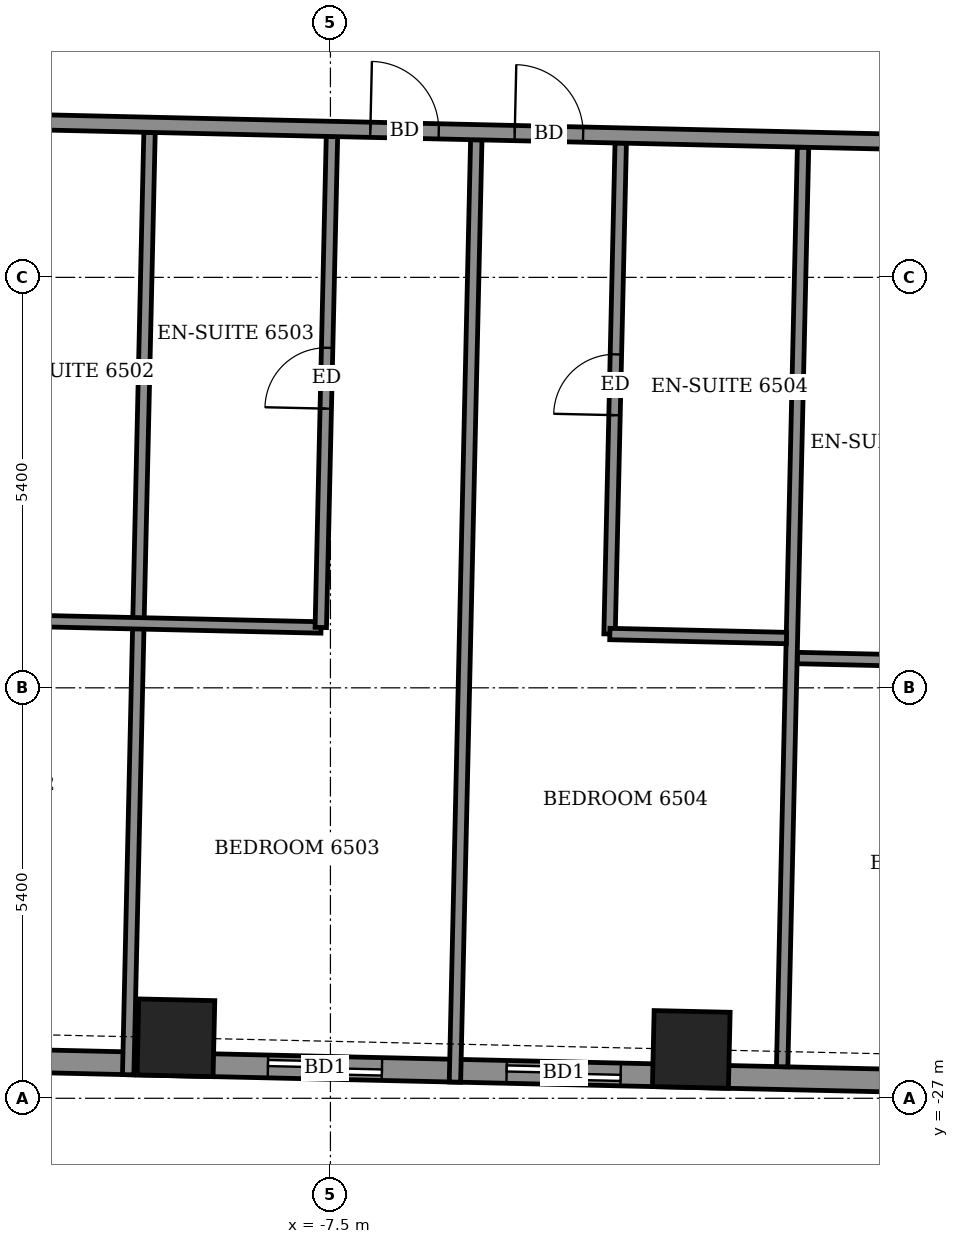
"""IFC4 building model, lengths in metres.
Left out: names, types, materials, properties, quantities, classifications, styles, units other than length and angle.
Written with IfcOpenShell. Run it as: python <this file> out.ifc"""

import sys

from ifc_helpers import new_model, si_unit, direction, frame, frame_2d, origin, origin_2d, place, context, subcontext, project, spatial, rectangle, extrude, element, fill, save


model = new_model("IFC4")
c1 = context("Model", 3, precision=1e-05, world=origin(), true_north=direction((0.0, 1.0)))
c2 = subcontext(c1, "Body", "Model", "MODEL_VIEW")
j1 = project(units=[si_unit("LENGTHUNIT", "METRE"), si_unit("PLANEANGLEUNIT", "RADIAN")], contexts=[c1])
p1 = place(None, origin())
s1 = spatial("IfcSite", under=j1, at=p1, CompositionType="ELEMENT")
p2 = place(p1, origin())
s2 = spatial("IfcBuilding", under=s1, at=p2, CompositionType="ELEMENT")
p3 = place(p2, frame((0.0, 0.0, 257.3)))
s3 = spatial("IfcBuildingStorey", under=s2, at=p3, CompositionType="ELEMENT", Elevation=257.3)
for number, where, z_axis, x_axis in (
    (1, (-9.533, -26.204, -0.55), (0.0, 0.0, 1.0), (1.0, -0.023, 0.0)),
    (2, (-2.753, -26.357, -0.55), (0.0, 0.0, 1.0), (1.0, -0.023, 0.0)),
):
    element("IfcColumn", number, at=place(p3, frame(where, z_axis=z_axis, x_axis=x_axis)), inside=s3, PredefinedType="COLUMN", context=c2, shape_type="SweptSolid", body=[
        extrude(rectangle(XDim=1.0, YDim=1.0, at=origin_2d()), origin(), (0.0, 0.0, 1.0), 3.6),
    ])
p4 = place(p3, frame((-22.95, -26.249, 0.0), z_axis=(0.0, 0.0, 1.0), x_axis=(0.999742196137, -0.022705533743, 0.0)))
e3 = element("IfcWall", 3, at=p4, inside=s3, PredefinedType="SOLIDWALL", context=c2, shape_type="SweptSolid", body=[
    extrude(rectangle(XDim=47.171, YDim=0.3, at=frame_2d((23.585, 0.0))), origin(), (0.0, 0.0, 1.0), 2.55),
])
p5 = place(p4, frame((1.676, 0.0, 0.0)))
e4 = element("IfcOpeningElement", 4, at=p5, cuts=e3, PredefinedType="OPENING", context=c2, shape_type="SweptSolid", body=[
    extrude(rectangle(XDim=1.5, YDim=2.4, at=frame_2d((0.75, 1.2))), frame((0.0, 0.16, 0.0), z_axis=(0.0, -1.0, 0.0), x_axis=(1.0, 0.0, 0.0)), (0.0, 0.0, 1.0), 0.32),
])
p6 = place(p4, frame((4.741, 0.0, 0.0)))
e5 = element("IfcOpeningElement", 5, at=p6, cuts=e3, PredefinedType="OPENING", context=c2, shape_type="SweptSolid", body=[
    extrude(rectangle(XDim=1.2, YDim=2.4, at=frame_2d((0.6, 1.2))), frame((0.0, 0.16, 0.0), z_axis=(0.0, -1.0, 0.0), x_axis=(1.0, 0.0, 0.0)), (0.0, 0.0, 1.0), 0.32),
])
p7 = place(p4, frame((9.9, 0.0, 0.0)))
e6 = element("IfcOpeningElement", 6, at=p7, cuts=e3, PredefinedType="OPENING", context=c2, shape_type="SweptSolid", body=[
    extrude(rectangle(XDim=1.5, YDim=2.4, at=frame_2d((0.75, 1.2))), frame((0.0, 0.16, 0.0), z_axis=(0.0, -1.0, 0.0), x_axis=(1.0, 0.0, 0.0)), (0.0, 0.0, 1.0), 0.32),
])
p8 = place(p4, frame((14.632, 0.0, 0.0)))
e7 = element("IfcOpeningElement", 7, at=p8, cuts=e3, PredefinedType="OPENING", context=c2, shape_type="SweptSolid", body=[
    extrude(rectangle(XDim=1.5, YDim=2.4, at=frame_2d((0.75, 1.2))), frame((0.0, 0.16, 0.0), z_axis=(0.0, -1.0, 0.0), x_axis=(1.0, 0.0, 0.0)), (0.0, 0.0, 1.0), 0.32),
])
p9 = place(p4, frame((17.773, 0.0, 0.0)))
e8 = element("IfcOpeningElement", 8, at=p9, cuts=e3, PredefinedType="OPENING", context=c2, shape_type="SweptSolid", body=[
    extrude(rectangle(XDim=1.5, YDim=2.4, at=frame_2d((0.75, 1.2))), frame((0.0, 0.16, 0.0), z_axis=(0.0, -1.0, 0.0), x_axis=(1.0, 0.0, 0.0)), (0.0, 0.0, 1.0), 0.32),
])
p10 = place(p4, frame((22.825, 0.0, 0.0)))
e9 = element("IfcOpeningElement", 9, at=p10, cuts=e3, PredefinedType="OPENING", context=c2, shape_type="SweptSolid", body=[
    extrude(rectangle(XDim=1.5, YDim=2.4, at=frame_2d((0.75, 1.2))), frame((0.0, 0.16, 0.0), z_axis=(0.0, -1.0, 0.0), x_axis=(1.0, 0.0, 0.0)), (0.0, 0.0, 1.0), 0.32),
])
p11 = place(p4, frame((27.863, 0.0, 0.0)))
e10 = element("IfcOpeningElement", 10, at=p11, cuts=e3, PredefinedType="OPENING", context=c2, shape_type="SweptSolid", body=[
    extrude(rectangle(XDim=1.5, YDim=2.4, at=frame_2d((0.75, 1.2))), frame((0.0, 0.16, 0.0), z_axis=(0.0, -1.0, 0.0), x_axis=(1.0, 0.0, 0.0)), (0.0, 0.0, 1.0), 0.32),
])
p12 = place(p4, frame((31.004, 0.0, 0.0)))
e11 = element("IfcOpeningElement", 11, at=p12, cuts=e3, PredefinedType="OPENING", context=c2, shape_type="SweptSolid", body=[
    extrude(rectangle(XDim=1.5, YDim=2.4, at=frame_2d((0.75, 1.2))), frame((0.0, 0.16, 0.0), z_axis=(0.0, -1.0, 0.0), x_axis=(1.0, 0.0, 0.0)), (0.0, 0.0, 1.0), 0.32),
])
p13 = place(p4, frame((35.675, 0.0, 0.0)))
e12 = element("IfcOpeningElement", 12, at=p13, cuts=e3, PredefinedType="OPENING", context=c2, shape_type="SweptSolid", body=[
    extrude(rectangle(XDim=1.5, YDim=2.4, at=frame_2d((0.75, 1.2))), frame((0.0, 0.16, 0.0), z_axis=(0.0, -1.0, 0.0), x_axis=(1.0, 0.0, 0.0)), (0.0, 0.0, 1.0), 0.32),
])
p14 = place(p4, frame((41.17, 0.0, 0.0)))
e13 = element("IfcOpeningElement", 13, at=p14, cuts=e3, PredefinedType="OPENING", context=c2, shape_type="SweptSolid", body=[
    extrude(rectangle(XDim=1.2, YDim=2.4, at=frame_2d((0.6, 1.2))), frame((0.0, 0.16, 0.0), z_axis=(0.0, -1.0, 0.0), x_axis=(1.0, 0.0, 0.0)), (0.0, 0.0, 1.0), 0.32),
])
p15 = place(p4, frame((43.438, 0.0, 0.9)))
e14 = element("IfcOpeningElement", 14, at=p15, cuts=e3, PredefinedType="OPENING", context=c2, shape_type="SweptSolid", body=[
    extrude(rectangle(XDim=2.4, YDim=1.5, at=frame_2d((1.2, 0.75))), frame((0.0, 0.16, 0.0), z_axis=(0.0, -1.0, 0.0), x_axis=(1.0, 0.0, 0.0)), (0.0, 0.0, 1.0), 0.32),
])
p16 = place(p3, frame((-10.161, -26.69, 0.0), z_axis=(0.0, 0.0, 1.0), x_axis=(0.022661475803, 0.999743195783, 0.0)))
e15 = element("IfcWall", 15, at=p16, inside=s3, PredefinedType="PARTITIONING", context=c2, shape_type="SweptSolid", body=[
    extrude(rectangle(XDim=12.4, YDim=0.15, at=frame_2d((6.2, 0.0))), origin(), (0.0, 0.0, 1.0), 2.55),
])
p17 = place(p3, frame((-5.862, -26.787, 0.0), z_axis=(0.0, 0.0, 1.0), x_axis=(0.022661029756, 0.999743205894, 0.0)))
e16 = element("IfcWall", 16, at=p17, inside=s3, PredefinedType="PARTITIONING", context=c2, shape_type="SweptSolid", body=[
    extrude(rectangle(XDim=12.4, YDim=0.15, at=frame_2d((6.2, 0.0))), origin(), (0.0, 0.0, 1.0), 2.55),
])
p18 = place(p3, frame((-1.557, -26.585, 0.0), z_axis=(0.0, 0.0, 1.0), x_axis=(0.022719113715, 0.999741887625, 0.0)))
e17 = element("IfcWall", 17, at=p18, inside=s3, PredefinedType="PARTITIONING", context=c2, shape_type="SweptSolid", body=[
    extrude(rectangle(XDim=12.1, YDim=0.15, at=frame_2d((6.05, 0.0))), origin(), (0.0, 0.0, 1.0), 2.55),
])
p19 = place(p3, frame((-1.355, -21.208, 0.0), z_axis=(0.0, 0.0, 1.0), x_axis=(0.999740260747, -0.02279059109, 0.0)))
e18 = element("IfcWall", 18, at=p19, inside=s3, PredefinedType="PARTITIONING", context=c2, shape_type="SweptSolid", body=[
    extrude(rectangle(XDim=2.324, YDim=0.15, at=frame_2d((1.162, 0.0))), origin(), (0.0, 0.0, 1.0), 3.05),
])
p20 = place(p3, frame((-12.422, -20.697, 0.0), z_axis=(0.0, 0.0, 1.0), x_axis=(0.999742701292, -0.022683280499, 0.0)))
e19 = element("IfcWall", 19, at=p20, inside=s3, PredefinedType="PARTITIONING", context=c2, shape_type="SweptSolid", body=[
    extrude(rectangle(XDim=4.8, YDim=0.15, at=frame_2d((2.4, 0.0))), origin(), (0.0, 0.0, 1.0), 3.05),
])
p21 = place(p3, frame((-7.627, -20.806, 0.0), z_axis=(0.0, 0.0, 1.0), x_axis=(0.02274887394, 0.999741210881, 0.0)))
e20 = element("IfcWall", 20, at=p21, inside=s3, PredefinedType="PARTITIONING", context=c2, shape_type="SweptSolid", body=[
    extrude(rectangle(XDim=6.461, YDim=0.15, at=frame_2d((3.23, 0.0))), origin(), (0.0, 0.0, 1.0), 3.05),
])
p22 = place(p21, frame((2.88, 0.0, 0.0)))
e21 = element("IfcOpeningElement", 21, at=p22, cuts=e20, PredefinedType="OPENING", context=c2, shape_type="SweptSolid", body=[
    extrude(rectangle(XDim=0.8, YDim=2.1, at=frame_2d((0.4, 1.05))), frame((0.0, 0.085, 0.0), z_axis=(0.0, -1.0, 0.0), x_axis=(1.0, 0.0, 0.0)), (0.0, 0.0, 1.0), 0.17),
])
p23 = place(p3, frame((-3.828, -20.892, 0.0), z_axis=(0.0, 0.0, 1.0), x_axis=(0.02274887394, 0.999741210881, 0.0)))
e22 = element("IfcWall", 22, at=p23, inside=s3, PredefinedType="PARTITIONING", context=c2, shape_type="SweptSolid", body=[
    extrude(rectangle(XDim=6.461, YDim=0.15, at=frame_2d((3.23, 0.0))), origin(), (0.0, 0.0, 1.0), 3.05),
])
p24 = place(p23, frame((2.88, 0.0, 0.0)))
e23 = element("IfcOpeningElement", 23, at=p24, cuts=e22, PredefinedType="OPENING", context=c2, shape_type="SweptSolid", body=[
    extrude(rectangle(XDim=0.8, YDim=2.1, at=frame_2d((0.4, 1.05))), frame((0.0, 0.085, 0.0), z_axis=(0.0, -1.0, 0.0), x_axis=(1.0, 0.0, 0.0)), (0.0, 0.0, 1.0), 0.17),
])
p25 = place(p3, frame((-3.824, -20.892, 0.0), z_axis=(0.0, 0.0, 1.0), x_axis=(0.999740260747, -0.02279059109, 0.0)))
e24 = element("IfcWall", 24, at=p25, inside=s3, PredefinedType="PARTITIONING", context=c2, shape_type="SweptSolid", body=[
    extrude(rectangle(XDim=2.324, YDim=0.15, at=frame_2d((1.162, 0.0))), origin(), (0.0, 0.0, 1.0), 3.05),
])
p26 = place(p3, frame((-25.12, -13.847, 0.0), z_axis=(0.0, 0.0, 1.0), x_axis=(0.999742852445, -0.022676617578, 0.0)))
e25 = element("IfcWall", 25, at=p26, inside=s3, PredefinedType="PARTITIONING", context=c2, shape_type="SweptSolid", body=[
    extrude(rectangle(XDim=52.873, YDim=0.2, at=frame_2d((26.437, 0.0))), origin(), (0.0, 0.0, 1.0), 3.05),
])
p27 = place(p26, frame((0.725, 0.0, 0.0)))
e26 = element("IfcOpeningElement", 26, at=p27, cuts=e25, PredefinedType="OPENING", context=c2, shape_type="SweptSolid", body=[
    extrude(rectangle(XDim=1.0, YDim=2.1, at=frame_2d((0.5, 1.05))), frame((0.0, 0.11, 0.0), z_axis=(0.0, -1.0, 0.0), x_axis=(1.0, 0.0, 0.0)), (0.0, 0.0, 1.0), 0.22),
])
p28 = place(p26, frame((5.1, 0.0, 0.0)))
e27 = element("IfcOpeningElement", 27, at=p28, cuts=e25, PredefinedType="OPENING", context=c2, shape_type="SweptSolid", body=[
    extrude(rectangle(XDim=0.9, YDim=2.1, at=frame_2d((0.45, 1.05))), frame((0.0, 0.11, 0.0), z_axis=(0.0, -1.0, 0.0), x_axis=(1.0, 0.0, 0.0)), (0.0, 0.0, 1.0), 0.22),
])
p29 = place(p26, frame((9.6, 0.0, 0.0)))
e28 = element("IfcOpeningElement", 28, at=p29, cuts=e25, PredefinedType="OPENING", context=c2, shape_type="SweptSolid", body=[
    extrude(rectangle(XDim=0.9, YDim=2.1, at=frame_2d((0.45, 1.05))), frame((0.0, 0.11, 0.0), z_axis=(0.0, -1.0, 0.0), x_axis=(1.0, 0.0, 0.0)), (0.0, 0.0, 1.0), 0.22),
])
p30 = place(p26, frame((11.45, 0.0, 0.0)))
e29 = element("IfcOpeningElement", 29, at=p30, cuts=e25, PredefinedType="OPENING", context=c2, shape_type="SweptSolid", body=[
    extrude(rectangle(XDim=0.9, YDim=2.1, at=frame_2d((0.45, 1.05))), frame((0.0, 0.11, 0.0), z_axis=(0.0, -1.0, 0.0), x_axis=(1.0, 0.0, 0.0)), (0.0, 0.0, 1.0), 0.22),
])
p31 = place(p26, frame((18.15, 0.0, 0.0)))
e30 = element("IfcOpeningElement", 30, at=p31, cuts=e25, PredefinedType="OPENING", context=c2, shape_type="SweptSolid", body=[
    extrude(rectangle(XDim=0.9, YDim=2.1, at=frame_2d((0.45, 1.05))), frame((0.0, 0.11, 0.0), z_axis=(0.0, -1.0, 0.0), x_axis=(1.0, 0.0, 0.0)), (0.0, 0.0, 1.0), 0.22),
])
p32 = place(p26, frame((20.05, 0.0, 0.0)))
e31 = element("IfcOpeningElement", 31, at=p32, cuts=e25, PredefinedType="OPENING", context=c2, shape_type="SweptSolid", body=[
    extrude(rectangle(XDim=0.9, YDim=2.1, at=frame_2d((0.45, 1.05))), frame((0.0, 0.11, 0.0), z_axis=(0.0, -1.0, 0.0), x_axis=(1.0, 0.0, 0.0)), (0.0, 0.0, 1.0), 0.22),
])
p33 = place(p26, frame((26.775, 0.0, 0.0)))
e32 = element("IfcOpeningElement", 32, at=p33, cuts=e25, PredefinedType="OPENING", context=c2, shape_type="SweptSolid", body=[
    extrude(rectangle(XDim=0.9, YDim=2.1, at=frame_2d((0.45, 1.05))), frame((0.0, 0.11, 0.0), z_axis=(0.0, -1.0, 0.0), x_axis=(1.0, 0.0, 0.0)), (0.0, 0.0, 1.0), 0.22),
])
p34 = place(p26, frame((28.675, 0.0, 0.0)))
e33 = element("IfcOpeningElement", 33, at=p34, cuts=e25, PredefinedType="OPENING", context=c2, shape_type="SweptSolid", body=[
    extrude(rectangle(XDim=0.9, YDim=2.1, at=frame_2d((0.45, 1.05))), frame((0.0, 0.11, 0.0), z_axis=(0.0, -1.0, 0.0), x_axis=(1.0, 0.0, 0.0)), (0.0, 0.0, 1.0), 0.22),
])
p35 = place(p26, frame((35.35, 0.0, 0.0)))
e34 = element("IfcOpeningElement", 34, at=p35, cuts=e25, PredefinedType="OPENING", context=c2, shape_type="SweptSolid", body=[
    extrude(rectangle(XDim=0.9, YDim=2.1, at=frame_2d((0.45, 1.05))), frame((0.0, 0.11, 0.0), z_axis=(0.0, -1.0, 0.0), x_axis=(1.0, 0.0, 0.0)), (0.0, 0.0, 1.0), 0.22),
])
p36 = place(p26, frame((37.225, 0.0, 0.0)))
e35 = element("IfcOpeningElement", 35, at=p36, cuts=e25, PredefinedType="OPENING", context=c2, shape_type="SweptSolid", body=[
    extrude(rectangle(XDim=0.9, YDim=2.1, at=frame_2d((0.45, 1.05))), frame((0.0, 0.11, 0.0), z_axis=(0.0, -1.0, 0.0), x_axis=(1.0, 0.0, 0.0)), (0.0, 0.0, 1.0), 0.22),
])
p37 = place(p26, frame((43.85, 0.0, 0.0)))
e36 = element("IfcOpeningElement", 36, at=p37, cuts=e25, PredefinedType="OPENING", context=c2, shape_type="SweptSolid", body=[
    extrude(rectangle(XDim=0.9, YDim=2.1, at=frame_2d((0.45, 1.05))), frame((0.0, 0.11, 0.0), z_axis=(0.0, -1.0, 0.0), x_axis=(1.0, 0.0, 0.0)), (0.0, 0.0, 1.0), 0.22),
])
p38 = place(p26, frame((50.786, 0.0, 0.0)))
e37 = element("IfcOpeningElement", 37, at=p38, cuts=e25, PredefinedType="OPENING", context=c2, shape_type="SweptSolid", body=[
    extrude(rectangle(XDim=1.0, YDim=2.1, at=frame_2d((0.5, 1.05))), frame((0.0, 0.11, 0.0), z_axis=(0.0, -1.0, 0.0), x_axis=(1.0, 0.0, 0.0)), (0.0, 0.0, 1.0), 0.22),
])
p39 = place(p26, frame((46.05, 0.0, 0.0)))
e38 = element("IfcOpeningElement", 38, at=p39, cuts=e25, PredefinedType="OPENING", context=c2, shape_type="SweptSolid", body=[
    extrude(rectangle(XDim=0.9, YDim=2.1, at=frame_2d((0.45, 1.05))), frame((0.0, 0.11, 0.0), z_axis=(0.0, -1.0, 0.0), x_axis=(1.0, 0.0, 0.0)), (0.0, 0.0, 1.0), 0.22),
])
p40 = place(p8, origin())
e39 = element("IfcDoor", 39, at=p40, inside=s3, OperationType="SLIDING_TO_LEFT", PredefinedType="DOOR", context=c2, shape_type="SweptSolid", body=[
    extrude(rectangle(XDim=1.5, YDim=2.4, at=frame_2d((0.75, 1.2))), frame((0.0, 0.025, 0.0), z_axis=(0.0, -1.0, 0.0), x_axis=(1.0, 0.0, 0.0)), (0.0, 0.0, 1.0), 0.05),
])
fill(e7, e39)
p41 = place(p9, origin())
e40 = element("IfcDoor", 40, at=p41, inside=s3, OperationType="SLIDING_TO_LEFT", PredefinedType="DOOR", context=c2, shape_type="SweptSolid", body=[
    extrude(rectangle(XDim=1.5, YDim=2.4, at=frame_2d((0.75, 1.2))), frame((0.0, 0.025, 0.0), z_axis=(0.0, -1.0, 0.0), x_axis=(1.0, 0.0, 0.0)), (0.0, 0.0, 1.0), 0.05),
])
fill(e8, e40)
p42 = place(p31, origin())
e41 = element("IfcDoor", 41, at=p42, inside=s3, OperationType="SINGLE_SWING_LEFT", PredefinedType="DOOR", context=c2, shape_type="SweptSolid", body=[
    extrude(rectangle(XDim=0.9, YDim=2.1, at=frame_2d((0.45, 1.05))), frame((0.0, 0.025, 0.0), z_axis=(0.0, -1.0, 0.0), x_axis=(1.0, 0.0, 0.0)), (0.0, 0.0, 1.0), 0.05),
])
fill(e30, e41)
p43 = place(p22, origin())
e42 = element("IfcDoor", 42, at=p43, inside=s3, OperationType="SINGLE_SWING_LEFT", PredefinedType="DOOR", context=c2, shape_type="SweptSolid", body=[
    extrude(rectangle(XDim=0.8, YDim=2.1, at=frame_2d((0.4, 1.05))), frame((0.0, 0.025, 0.0), z_axis=(0.0, -1.0, 0.0), x_axis=(1.0, 0.0, 0.0)), (0.0, 0.0, 1.0), 0.05),
])
fill(e21, e42)
p44 = place(p32, origin())
e43 = element("IfcDoor", 43, at=p44, inside=s3, OperationType="SINGLE_SWING_RIGHT", PredefinedType="DOOR", context=c2, shape_type="SweptSolid", body=[
    extrude(rectangle(XDim=0.9, YDim=2.1, at=frame_2d((0.45, 1.05))), frame((0.0, 0.025, 0.0), z_axis=(0.0, -1.0, 0.0), x_axis=(1.0, 0.0, 0.0)), (0.0, 0.0, 1.0), 0.05),
])
fill(e31, e43)
p45 = place(p24, origin())
e44 = element("IfcDoor", 44, at=p45, inside=s3, OperationType="SINGLE_SWING_RIGHT", PredefinedType="DOOR", context=c2, shape_type="SweptSolid", body=[
    extrude(rectangle(XDim=0.8, YDim=2.1, at=frame_2d((0.4, 1.05))), frame((0.0, 0.025, 0.0), z_axis=(0.0, -1.0, 0.0), x_axis=(1.0, 0.0, 0.0)), (0.0, 0.0, 1.0), 0.05),
])
fill(e23, e44)
save(model, sys.argv[1])
